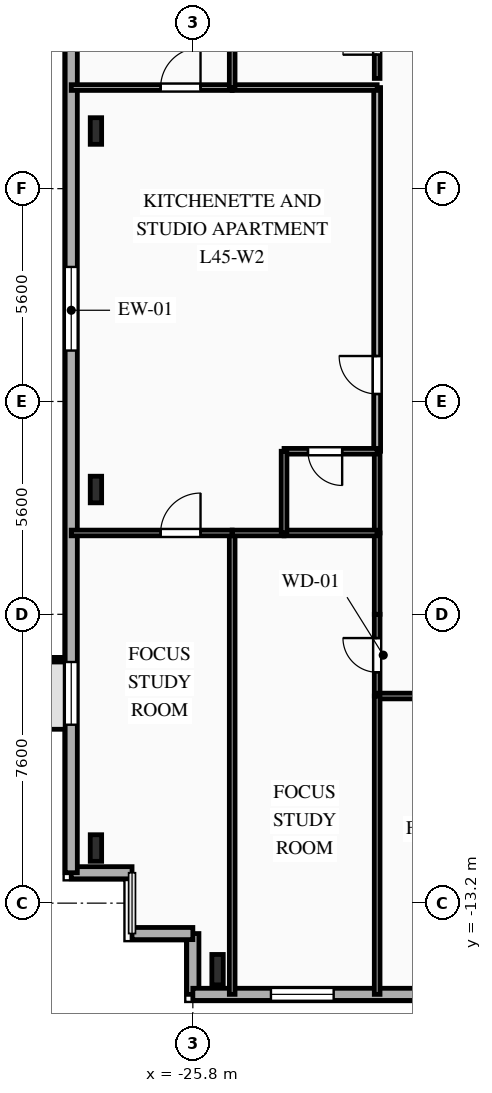
"""IFC4 building model, lengths in metres.
Left out: names, types, materials, properties, quantities, classifications, styles, units other than length and angle.
Written with IfcOpenShell. Run it as: python <this file> out.ifc"""

import sys

from ifc_helpers import new_model, si_unit, direction, frame, frame_2d, origin, origin_2d, place, context, subcontext, project, spatial, rectangle, i_section, extrude, element, fill, save


model = new_model("IFC4")
c1 = context("Model", 3, precision=1e-05, world=origin(), true_north=direction((0.0, 1.0)))
c2 = subcontext(c1, "Body", "Model", "MODEL_VIEW")
j1 = project(units=[si_unit("LENGTHUNIT", "METRE"), si_unit("PLANEANGLEUNIT", "RADIAN")], contexts=[c1])
p1 = place(None, origin())
s1 = spatial("IfcSite", under=j1, at=p1, CompositionType="ELEMENT")
p2 = place(p1, origin())
s2 = spatial("IfcBuilding", under=s1, at=p2, CompositionType="ELEMENT")
p3 = place(p2, frame((0.0, 0.0, 161.15)))
s3 = spatial("IfcBuildingStorey", under=s2, at=p3, CompositionType="ELEMENT", Elevation=161.15)
p4 = place(p3, frame((-25.15, -14.95, 0.0), z_axis=(0.0, 0.0, 1.0), x_axis=(1.0, 0.0, 0.0)))
e1 = element("IfcColumn", 1, at=p4, inside=s3, PredefinedType="COLUMN", context=c2, shape_type="SweptSolid", body=[
    extrude(i_section(OverallWidth=0.3, OverallDepth=0.8, WebThickness=0.018, FlangeThickness=0.033, FilletRadius=0.03, at=origin_2d()), origin(), (0.0, 0.0, 1.0), 3.35),
])
for number, where, z_axis, x_axis in (
    (2, (-28.35, 7.117, 0.0), (0.0, 0.0, 1.0), (1.0, 0.0, 0.0)),
    (3, (-28.35, -2.317, 0.0), (0.0, 0.0, 1.0), (1.0, 0.0, 0.0)),
    (4, (-28.35, -11.75, 0.0), (0.0, 0.0, 1.0), (1.0, 0.0, 0.0)),
):
    element("IfcColumn", number, at=place(p3, frame(where, z_axis=z_axis, x_axis=x_axis)), inside=s3, PredefinedType="COLUMN", context=c2, shape_type="SweptSolid", body=[
        extrude(i_section(OverallWidth=0.3, OverallDepth=0.7, WebThickness=0.017, FlangeThickness=0.032, FilletRadius=0.027, at=origin_2d()), origin(), (0.0, 0.0, 1.0), 3.35),
    ])
p5 = place(p3, frame((-25.8, -15.6, 0.0), z_axis=(0.0, 0.0, 1.0), x_axis=(0.0, 1.0, 0.0)))
e5 = element("IfcWall", 5, at=p5, inside=s3, PredefinedType="SOLIDWALL", context=c2, shape_type="SweptSolid", body=[
    extrude(rectangle(XDim=1.6, YDim=0.32, at=frame_2d((0.8, 0.0))), origin(), (0.0, 0.0, 1.0), 3.04),
])
p6 = place(p3, frame((-25.8, -14.0, 0.0), z_axis=(0.0, 0.0, 1.0), x_axis=(-1.0, 0.0, 0.0)))
e6 = element("IfcWall", 6, at=p6, inside=s3, PredefinedType="SOLIDWALL", context=c2, shape_type="SweptSolid", body=[
    extrude(rectangle(XDim=1.6, YDim=0.32, at=frame_2d((0.8, 0.0))), origin(), (0.0, 0.0, 1.0), 3.04),
])
p7 = place(p3, frame((-27.4, -12.4, 0.0), z_axis=(0.0, 0.0, 1.0), x_axis=(-1.0, 0.0, 0.0)))
e7 = element("IfcWall", 7, at=p7, inside=s3, PredefinedType="SOLIDWALL", context=c2, shape_type="SweptSolid", body=[
    extrude(rectangle(XDim=1.6, YDim=0.32, at=frame_2d((0.8, 0.0))), origin(), (0.0, 0.0, 1.0), 3.04),
])
p8 = place(p3, frame((-29.0, -12.4, 0.0), z_axis=(0.0, 0.0, 1.0), x_axis=(0.0, 1.0, 0.0)))
e8 = element("IfcWall", 8, at=p8, inside=s3, PredefinedType="SOLIDWALL", context=c2, shape_type="SweptSolid", body=[
    extrude(rectangle(XDim=29.6, YDim=0.32, at=frame_2d((14.8, 0.0))), origin(), (0.0, 0.0, 1.0), 3.04),
])
p9 = place(p8, frame((3.895, 0.0, 0.85)))
e9 = element("IfcOpeningElement", 9, at=p9, cuts=e8, PredefinedType="OPENING", context=c2, shape_type="SweptSolid", body=[
    extrude(rectangle(XDim=1.65, YDim=1.85, at=frame_2d((0.825, 0.925))), frame((0.0, 0.17, 0.0), z_axis=(0.0, -1.0, 0.0), x_axis=(1.0, 0.0, 0.0)), (0.0, 0.0, 1.0), 0.34),
])
p10 = place(p8, frame((13.74, 0.0, 0.85)))
e10 = element("IfcOpeningElement", 10, at=p10, cuts=e8, PredefinedType="OPENING", context=c2, shape_type="SweptSolid", body=[
    extrude(rectangle(XDim=2.2, YDim=1.85, at=frame_2d((1.1, 0.925))), frame((0.0, 0.17, 0.0), z_axis=(0.0, -1.0, 0.0), x_axis=(1.0, 0.0, 0.0)), (0.0, 0.0, 1.0), 0.34),
])
p11 = place(p8, frame((24.135, 0.0, 0.85)))
e11 = element("IfcOpeningElement", 11, at=p11, cuts=e8, PredefinedType="OPENING", context=c2, shape_type="SweptSolid", body=[
    extrude(rectangle(XDim=1.65, YDim=1.85, at=frame_2d((0.825, 0.925))), frame((0.0, 0.17, 0.0), z_axis=(0.0, -1.0, 0.0), x_axis=(1.0, 0.0, 0.0)), (0.0, 0.0, 1.0), 0.34),
])
p12 = place(p3, frame((23.8, -15.6, 0.0), z_axis=(0.0, 0.0, 1.0), x_axis=(-1.0, 0.0, 0.0)))
e12 = element("IfcWall", 12, at=p12, inside=s3, PredefinedType="SOLIDWALL", context=c2, shape_type="SweptSolid", body=[
    extrude(rectangle(XDim=49.6, YDim=0.32, at=frame_2d((24.8, 0.0))), origin(), (0.0, 0.0, 1.0), 3.04),
])
p13 = place(p12, frame((1.13, 0.0, 0.85)))
e13 = element("IfcOpeningElement", 13, at=p13, cuts=e12, PredefinedType="OPENING", context=c2, shape_type="SweptSolid", body=[
    extrude(rectangle(XDim=1.1, YDim=1.85, at=frame_2d((0.55, 0.925))), frame((0.0, 0.17, 0.0), z_axis=(0.0, -1.0, 0.0), x_axis=(1.0, 0.0, 0.0)), (0.0, 0.0, 1.0), 0.34),
])
p14 = place(p12, frame((5.295, 0.0, 0.85)))
e14 = element("IfcOpeningElement", 14, at=p14, cuts=e12, PredefinedType="OPENING", context=c2, shape_type="SweptSolid", body=[
    extrude(rectangle(XDim=1.65, YDim=1.85, at=frame_2d((0.825, 0.925))), frame((0.0, 0.17, 0.0), z_axis=(0.0, -1.0, 0.0), x_axis=(1.0, 0.0, 0.0)), (0.0, 0.0, 1.0), 0.34),
])
p15 = place(p12, frame((11.74, 0.0, 0.85)))
e15 = element("IfcOpeningElement", 15, at=p15, cuts=e12, PredefinedType="OPENING", context=c2, shape_type="SweptSolid", body=[
    extrude(rectangle(XDim=2.2, YDim=1.85, at=frame_2d((1.1, 0.925))), frame((0.0, 0.17, 0.0), z_axis=(0.0, -1.0, 0.0), x_axis=(1.0, 0.0, 0.0)), (0.0, 0.0, 1.0), 0.34),
])
p16 = place(p12, frame((18.74, 0.0, 0.85)))
e16 = element("IfcOpeningElement", 16, at=p16, cuts=e12, PredefinedType="OPENING", context=c2, shape_type="SweptSolid", body=[
    extrude(rectangle(XDim=2.2, YDim=1.85, at=frame_2d((1.1, 0.925))), frame((0.0, 0.17, 0.0), z_axis=(0.0, -1.0, 0.0), x_axis=(1.0, 0.0, 0.0)), (0.0, 0.0, 1.0), 0.34),
])
p17 = place(p12, frame((25.74, 0.0, 0.85)))
e17 = element("IfcOpeningElement", 17, at=p17, cuts=e12, PredefinedType="OPENING", context=c2, shape_type="SweptSolid", body=[
    extrude(rectangle(XDim=2.2, YDim=1.85, at=frame_2d((1.1, 0.925))), frame((0.0, 0.17, 0.0), z_axis=(0.0, -1.0, 0.0), x_axis=(1.0, 0.0, 0.0)), (0.0, 0.0, 1.0), 0.34),
])
p18 = place(p12, frame((33.348, 0.0, 0.85)))
e18 = element("IfcOpeningElement", 18, at=p18, cuts=e12, PredefinedType="OPENING", context=c2, shape_type="SweptSolid", body=[
    extrude(rectangle(XDim=2.2, YDim=1.85, at=frame_2d((1.1, 0.925))), frame((0.0, 0.17, 0.0), z_axis=(0.0, -1.0, 0.0), x_axis=(1.0, 0.0, 0.0)), (0.0, 0.0, 1.0), 0.34),
])
p19 = place(p12, frame((38.972, 0.0, 0.85)))
e19 = element("IfcOpeningElement", 19, at=p19, cuts=e12, PredefinedType="OPENING", context=c2, shape_type="SweptSolid", body=[
    extrude(rectangle(XDim=1.65, YDim=1.85, at=frame_2d((0.825, 0.925))), frame((0.0, 0.17, 0.0), z_axis=(0.0, -1.0, 0.0), x_axis=(1.0, 0.0, 0.0)), (0.0, 0.0, 1.0), 0.34),
])
p20 = place(p12, frame((45.895, 0.0, 0.85)))
e20 = element("IfcOpeningElement", 20, at=p20, cuts=e12, PredefinedType="OPENING", context=c2, shape_type="SweptSolid", body=[
    extrude(rectangle(XDim=1.65, YDim=1.85, at=frame_2d((0.825, 0.925))), frame((0.0, 0.17, 0.0), z_axis=(0.0, -1.0, 0.0), x_axis=(1.0, 0.0, 0.0)), (0.0, 0.0, 1.0), 0.34),
])
p21 = place(p3, frame((-20.95, 8.5, 0.0), z_axis=(0.0, 0.0, 1.0), x_axis=(0.0, 1.0, 0.0)))
e21 = element("IfcWall", 21, at=p21, inside=s3, PredefinedType="PARTITIONING", context=c2, shape_type="SweptSolid", body=[
    extrude(rectangle(XDim=2.15, YDim=0.15, at=frame_2d((1.075, 0.0))), origin(), (0.0, 0.0, 1.0), 3.04),
])
p22 = place(p21, frame((0.625, 0.0, 0.0)))
e22 = element("IfcOpeningElement", 22, at=p22, cuts=e21, PredefinedType="OPENING", context=c2, shape_type="SweptSolid", body=[
    extrude(rectangle(XDim=0.9, YDim=2.1, at=frame_2d((0.45, 1.05))), frame((0.0, 0.085, 0.0), z_axis=(0.0, -1.0, 0.0), x_axis=(1.0, 0.0, 0.0)), (0.0, 0.0, 1.0), 0.17),
])
p23 = place(p3, frame((-20.95, -7.75, 0.0), z_axis=(0.0, 0.0, 1.0), x_axis=(0.0, 1.0, 0.0)))
e23 = element("IfcWall", 23, at=p23, inside=s3, PredefinedType="PARTITIONING", context=c2, shape_type="SweptSolid", body=[
    extrude(rectangle(XDim=2.15, YDim=0.15, at=frame_2d((1.075, 0.0))), origin(), (0.0, 0.0, 1.0), 3.04),
])
p24 = place(p23, frame((0.625, 0.0, 0.0)))
e24 = element("IfcOpeningElement", 24, at=p24, cuts=e23, PredefinedType="OPENING", context=c2, shape_type="SweptSolid", body=[
    extrude(rectangle(XDim=0.9, YDim=2.1, at=frame_2d((0.45, 1.05))), frame((0.0, 0.085, 0.0), z_axis=(0.0, -1.0, 0.0), x_axis=(1.0, 0.0, 0.0)), (0.0, 0.0, 1.0), 0.17),
])
p25 = place(p3, frame((-13.467, -7.75, 0.0), z_axis=(0.0, 0.0, 1.0), x_axis=(-1.0, 0.0, 0.0)))
e25 = element("IfcWall", 25, at=p25, inside=s3, PredefinedType="PARTITIONING", context=c2, shape_type="SweptSolid", body=[
    extrude(rectangle(XDim=7.483, YDim=0.15, at=frame_2d((3.741, 0.0))), origin(), (0.0, 0.0, 1.0), 3.04),
])
p26 = place(p25, frame((1.239, 0.0, 0.0)))
e26 = element("IfcOpeningElement", 26, at=p26, cuts=e25, PredefinedType="OPENING", context=c2, shape_type="SweptSolid", body=[
    extrude(rectangle(XDim=1.05, YDim=2.15, at=frame_2d((0.525, 1.075))), frame((0.0, 0.085, 0.0), z_axis=(0.0, -1.0, 0.0), x_axis=(1.0, 0.0, 0.0)), (0.0, 0.0, 1.0), 0.17),
])
p27 = place(p3, frame((-20.95, -5.6, 0.0), z_axis=(0.0, 0.0, 1.0), x_axis=(0.0, 1.0, 0.0)))
e27 = element("IfcWall", 27, at=p27, inside=s3, PredefinedType="PARTITIONING", context=c2, shape_type="SweptSolid", body=[
    extrude(rectangle(XDim=2.14, YDim=0.15, at=frame_2d((1.07, 0.0))), origin(), (0.0, 0.0, 1.0), 3.04),
])
p28 = place(p3, frame((-20.95, -1.31, 0.0), z_axis=(0.0, 0.0, 1.0), x_axis=(0.0, 1.0, 0.0)))
e28 = element("IfcWall", 28, at=p28, inside=s3, PredefinedType="PARTITIONING", context=c2, shape_type="SweptSolid", body=[
    extrude(rectangle(XDim=9.57, YDim=0.18, at=frame_2d((4.785, 0.0))), origin(), (0.0, 0.0, 1.0), 3.04),
])
p29 = place(p28, frame((1.506, 0.0, 0.0)))
e29 = element("IfcOpeningElement", 29, at=p29, cuts=e28, PredefinedType="OPENING", context=c2, shape_type="SweptSolid", body=[
    extrude(rectangle(XDim=1.0, YDim=2.15, at=frame_2d((0.5, 1.075))), frame((0.0, 0.1, 0.0), z_axis=(0.0, -1.0, 0.0), x_axis=(1.0, 0.0, 0.0)), (0.0, 0.0, 1.0), 0.2),
])
p30 = place(p3, frame((-20.95, -3.46, 0.0), z_axis=(0.0, 0.0, 1.0), x_axis=(0.0, 1.0, 0.0)))
e30 = element("IfcWall", 30, at=p30, inside=s3, PredefinedType="PLUMBINGWALL", context=c2, shape_type="SweptSolid", body=[
    extrude(rectangle(XDim=2.15, YDim=0.15, at=frame_2d((1.075, 0.0))), origin(), (0.0, 0.0, 1.0), 3.04),
])
p31 = place(p3, frame((-24.765, -3.46, 0.0), z_axis=(0.0, 0.0, 1.0), x_axis=(0.0, -1.0, 0.0)))
e31 = element("IfcWall", 31, at=p31, inside=s3, PredefinedType="PARTITIONING", context=c2, shape_type="SweptSolid", body=[
    extrude(rectangle(XDim=12.14, YDim=0.15, at=frame_2d((6.07, 0.0))), origin(), (0.0, 0.0, 1.0), 3.04),
])
p32 = place(p3, frame((-29.0, -3.46, 0.0), z_axis=(0.0, 0.0, 1.0), x_axis=(1.0, 0.0, 0.0)))
e32 = element("IfcWall", 32, at=p32, inside=s3, PredefinedType="PARTITIONING", context=c2, shape_type="SweptSolid", body=[
    extrude(rectangle(XDim=4.235, YDim=0.15, at=frame_2d((2.118, 0.0))), origin(), (0.0, 0.0, 1.0), 3.04),
])
p33 = place(p32, frame((2.352, 0.0, 0.0)))
e33 = element("IfcOpeningElement", 33, at=p33, cuts=e32, PredefinedType="OPENING", context=c2, shape_type="SweptSolid", body=[
    extrude(rectangle(XDim=1.05, YDim=2.15, at=frame_2d((0.525, 1.075))), frame((0.0, 0.085, 0.0), z_axis=(0.0, -1.0, 0.0), x_axis=(1.0, 0.0, 0.0)), (0.0, 0.0, 1.0), 0.17),
])
p34 = place(p3, frame((-24.765, -3.46, 0.0), z_axis=(0.0, 0.0, 1.0), x_axis=(1.0, 0.0, 0.0)))
e34 = element("IfcWall", 34, at=p34, inside=s3, PredefinedType="PARTITIONING", context=c2, shape_type="SweptSolid", body=[
    extrude(rectangle(XDim=1.365, YDim=0.15, at=frame_2d((0.683, 0.0))), origin(), (0.0, 0.0, 1.0), 3.04),
])
p35 = place(p3, frame((-23.4, -3.46, 0.0), z_axis=(0.0, 0.0, 1.0), x_axis=(1.0, 0.0, 0.0)))
e35 = element("IfcWall", 35, at=p35, inside=s3, PredefinedType="PLUMBINGWALL", context=c2, shape_type="SweptSolid", body=[
    extrude(rectangle(XDim=2.45, YDim=0.15, at=frame_2d((1.225, 0.0))), origin(), (0.0, 0.0, 1.0), 3.04),
])
p36 = place(p3, frame((-20.95, -7.75, 0.0), z_axis=(0.0, 0.0, 1.0), x_axis=(0.0, -1.0, 0.0)))
e36 = element("IfcWall", 36, at=p36, inside=s3, PredefinedType="PARTITIONING", context=c2, shape_type="SweptSolid", body=[
    extrude(rectangle(XDim=7.85, YDim=0.15, at=frame_2d((3.925, 0.0))), origin(), (0.0, 0.0, 1.0), 3.04),
])
p37 = place(p3, frame((-20.95, -1.31, 0.0), z_axis=(0.0, 0.0, 1.0), x_axis=(-1.0, 0.0, 0.0)))
e37 = element("IfcWall", 37, at=p37, inside=s3, PredefinedType="PLUMBINGWALL", context=c2, shape_type="SweptSolid", body=[
    extrude(rectangle(XDim=2.45, YDim=0.15, at=frame_2d((1.225, 0.0))), origin(), (0.0, 0.0, 1.0), 3.04),
])
p38 = place(p37, frame((0.921, 0.0, 0.0)))
e38 = element("IfcOpeningElement", 38, at=p38, cuts=e37, PredefinedType="OPENING", context=c2, shape_type="SweptSolid", body=[
    extrude(rectangle(XDim=0.9, YDim=2.1, at=frame_2d((0.45, 1.05))), frame((0.0, 0.085, 0.0), z_axis=(0.0, -1.0, 0.0), x_axis=(1.0, 0.0, 0.0)), (0.0, 0.0, 1.0), 0.17),
])
p39 = place(p3, frame((-23.4, -1.31, 0.0), z_axis=(0.0, 0.0, 1.0), x_axis=(0.0, -1.0, 0.0)))
e39 = element("IfcWall", 39, at=p39, inside=s3, PredefinedType="PLUMBINGWALL", context=c2, shape_type="SweptSolid", body=[
    extrude(rectangle(XDim=2.15, YDim=0.15, at=frame_2d((1.075, 0.0))), origin(), (0.0, 0.0, 1.0), 3.04),
])
p40 = place(p3, frame((-29.0, 8.26, 0.0), z_axis=(0.0, 0.0, 1.0), x_axis=(1.0, 0.0, 0.0)))
e40 = element("IfcWall", 40, at=p40, inside=s3, PredefinedType="PARTITIONING", context=c2, shape_type="SweptSolid", body=[
    extrude(rectangle(XDim=4.235, YDim=0.15, at=frame_2d((2.118, 0.0))), origin(), (0.0, 0.0, 1.0), 3.04),
])
p41 = place(p40, frame((2.352, 0.0, 0.0)))
e41 = element("IfcOpeningElement", 41, at=p41, cuts=e40, PredefinedType="OPENING", context=c2, shape_type="SweptSolid", body=[
    extrude(rectangle(XDim=1.05, YDim=2.15, at=frame_2d((0.525, 1.075))), frame((0.0, 0.085, 0.0), z_axis=(0.0, -1.0, 0.0), x_axis=(1.0, 0.0, 0.0)), (0.0, 0.0, 1.0), 0.17),
])
p42 = place(p3, frame((-24.765, 8.26, 0.0), z_axis=(0.0, 0.0, 1.0), x_axis=(1.0, 0.0, 0.0)))
e42 = element("IfcWall", 42, at=p42, inside=s3, PredefinedType="PARTITIONING", context=c2, shape_type="SweptSolid", body=[
    extrude(rectangle(XDim=3.815, YDim=0.15, at=frame_2d((1.907, 0.0))), origin(), (0.0, 0.0, 1.0), 3.04),
])
p43 = place(p3, frame((-24.765, 20.4, 0.0), z_axis=(0.0, 0.0, 1.0), x_axis=(0.0, -1.0, 0.0)))
e43 = element("IfcWall", 43, at=p43, inside=s3, PredefinedType="PARTITIONING", context=c2, shape_type="SweptSolid", body=[
    extrude(rectangle(XDim=12.14, YDim=0.15, at=frame_2d((6.07, 0.0))), origin(), (0.0, 0.0, 1.0), 3.04),
])
p44 = place(p9, origin())
e44 = element("IfcWindow", 44, at=p44, inside=s3, PartitioningType="SINGLE_PANEL", PredefinedType="WINDOW", context=c2, shape_type="SweptSolid", body=[
    extrude(rectangle(XDim=1.65, YDim=1.85, at=frame_2d((0.825, 0.925))), frame((0.0, 0.03, 0.0), z_axis=(0.0, -1.0, 0.0), x_axis=(1.0, 0.0, 0.0)), (0.0, 0.0, 1.0), 0.06),
])
fill(e9, e44)
p45 = place(p10, origin())
e45 = element("IfcWindow", 45, at=p45, inside=s3, PartitioningType="SINGLE_PANEL", PredefinedType="WINDOW", context=c2, shape_type="SweptSolid", body=[
    extrude(rectangle(XDim=2.2, YDim=1.85, at=frame_2d((1.1, 0.925))), frame((0.0, 0.03, 0.0), z_axis=(0.0, -1.0, 0.0), x_axis=(1.0, 0.0, 0.0)), (0.0, 0.0, 1.0), 0.06),
])
fill(e10, e45)
p46 = place(p20, origin())
e46 = element("IfcWindow", 46, at=p46, inside=s3, PartitioningType="SINGLE_PANEL", PredefinedType="WINDOW", context=c2, shape_type="SweptSolid", body=[
    extrude(rectangle(XDim=1.65, YDim=1.85, at=frame_2d((0.825, 0.925))), frame((0.0, 0.03, 0.0), z_axis=(0.0, -1.0, 0.0), x_axis=(1.0, 0.0, 0.0)), (0.0, 0.0, 1.0), 0.06),
])
fill(e20, e46)
p47 = place(p22, origin())
e47 = element("IfcDoor", 47, at=p47, inside=s3, OperationType="SINGLE_SWING_LEFT", PredefinedType="DOOR", context=c2, shape_type="SweptSolid", body=[
    extrude(rectangle(XDim=0.9, YDim=2.1, at=frame_2d((0.45, 1.05))), frame((0.0, 0.025, 0.0), z_axis=(0.0, -1.0, 0.0), x_axis=(1.0, 0.0, 0.0)), (0.0, 0.0, 1.0), 0.05),
])
fill(e22, e47)
p48 = place(p24, origin())
e48 = element("IfcDoor", 48, at=p48, inside=s3, OperationType="SINGLE_SWING_RIGHT", PredefinedType="DOOR", context=c2, shape_type="SweptSolid", body=[
    extrude(rectangle(XDim=0.9, YDim=2.1, at=frame_2d((0.45, 1.05))), frame((0.0, 0.025, 0.0), z_axis=(0.0, -1.0, 0.0), x_axis=(1.0, 0.0, 0.0)), (0.0, 0.0, 1.0), 0.05),
])
fill(e24, e48)
p49 = place(p29, origin())
e49 = element("IfcDoor", 49, at=p49, inside=s3, OperationType="SINGLE_SWING_RIGHT", PredefinedType="DOOR", context=c2, shape_type="SweptSolid", body=[
    extrude(rectangle(XDim=1.0, YDim=2.15, at=frame_2d((0.5, 1.075))), frame((0.0, 0.025, 0.0), z_axis=(0.0, -1.0, 0.0), x_axis=(1.0, 0.0, 0.0)), (0.0, 0.0, 1.0), 0.05),
])
fill(e29, e49)
p50 = place(p33, origin())
e50 = element("IfcDoor", 50, at=p50, inside=s3, OperationType="SINGLE_SWING_RIGHT", PredefinedType="DOOR", context=c2, shape_type="SweptSolid", body=[
    extrude(rectangle(XDim=1.05, YDim=2.15, at=frame_2d((0.525, 1.075))), frame((0.0, 0.025, 0.0), z_axis=(0.0, -1.0, 0.0), x_axis=(1.0, 0.0, 0.0)), (0.0, 0.0, 1.0), 0.05),
])
fill(e33, e50)
p51 = place(p38, origin())
e51 = element("IfcDoor", 51, at=p51, inside=s3, OperationType="SINGLE_SWING_LEFT", PredefinedType="DOOR", context=c2, shape_type="SweptSolid", body=[
    extrude(rectangle(XDim=0.9, YDim=2.1, at=frame_2d((0.45, 1.05))), frame((0.0, 0.025, 0.0), z_axis=(0.0, -1.0, 0.0), x_axis=(1.0, 0.0, 0.0)), (0.0, 0.0, 1.0), 0.05),
])
fill(e38, e51)
p52 = place(p41, origin())
e52 = element("IfcDoor", 52, at=p52, inside=s3, OperationType="SINGLE_SWING_RIGHT", PredefinedType="DOOR", context=c2, shape_type="SweptSolid", body=[
    extrude(rectangle(XDim=1.05, YDim=2.15, at=frame_2d((0.525, 1.075))), frame((0.0, 0.025, 0.0), z_axis=(0.0, -1.0, 0.0), x_axis=(1.0, 0.0, 0.0)), (0.0, 0.0, 1.0), 0.05),
])
fill(e41, e52)
save(model, sys.argv[1])
